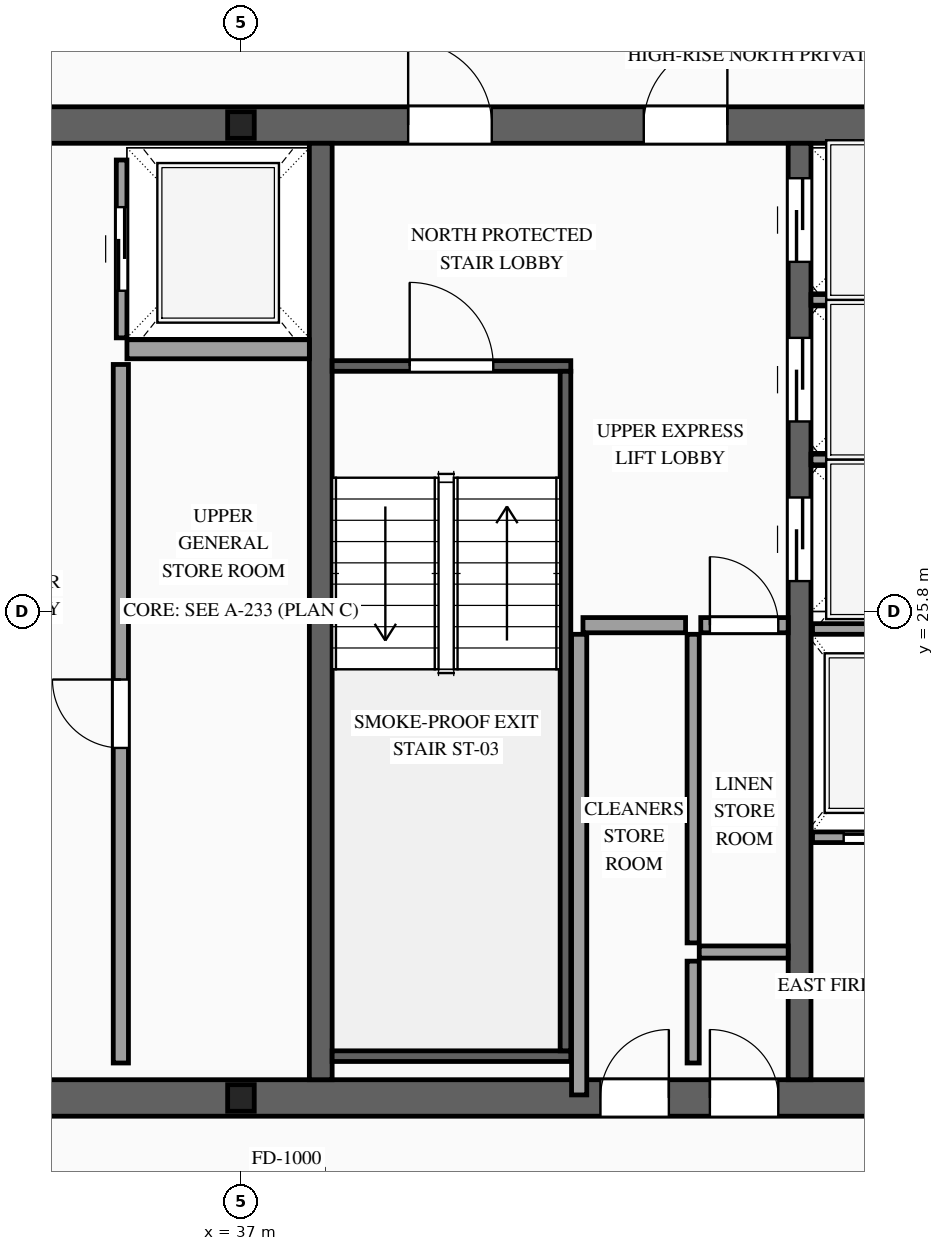
"""IFC4 building model, lengths in metres.
Left out: names, types, materials, properties, quantities, classifications, styles, units other than length and angle.
Written with IfcOpenShell. Run it as: python <this file> out.ifc"""

import sys

from ifc_helpers import new_model, si_unit, direction, frame, frame_2d, origin, origin_2d, place, context, subcontext, project, spatial, rectangle, i_section, extrude, source, transform, mapped, element, fill, save


model = new_model("IFC4")
c1 = context("Model", 3, precision=1e-05, world=origin(), true_north=direction((0.0, 1.0)))
c2 = subcontext(c1, "Body", "Model", "MODEL_VIEW")
j1 = project(units=[si_unit("LENGTHUNIT", "METRE"), si_unit("PLANEANGLEUNIT", "RADIAN")], contexts=[c1])
p1 = place(None, origin())
s1 = spatial("IfcSite", under=j1, at=p1, CompositionType="ELEMENT")
p2 = place(p1, origin())
s2 = spatial("IfcBuilding", under=s1, at=p2, CompositionType="ELEMENT")
p3 = place(p2, frame((0.0, 0.0, 335.7)))
s3 = spatial("IfcBuildingStorey", under=s2, at=p3, CompositionType="ELEMENT", Elevation=335.7)
p4 = place(p3, frame((23.56, 19.4, 0.0), z_axis=(0.0, 0.0, 1.0), x_axis=(1.0, 0.0, 0.0)))
e1 = element("IfcWall", 1, at=p4, inside=s3, PredefinedType="SHEAR", context=c2, shape_type="SweptSolid", body=[
    extrude(rectangle(XDim=26.88, YDim=0.48, at=frame_2d((13.44, 0.0))), origin(), (0.0, 0.0, 1.0), 3.5),
])
p5 = place(p4, frame((1.89, 0.0, 0.0)))
e2 = element("IfcOpeningElement", 2, at=p5, cuts=e1, PredefinedType="OPENING", context=c2, shape_type="SweptSolid", body=[
    extrude(rectangle(XDim=1.1, YDim=2.2, at=frame_2d((0.55, 1.1))), frame((0.0, 0.255, 0.0), z_axis=(0.0, -1.0, 0.0), x_axis=(1.0, 0.0, 0.0)), (0.0, 0.0, 1.0), 0.51),
])
p6 = place(p4, frame((9.79, 0.0, 0.0)))
e3 = element("IfcOpeningElement", 3, at=p6, cuts=e1, PredefinedType="OPENING", context=c2, shape_type="SweptSolid", body=[
    extrude(rectangle(XDim=1.1, YDim=2.2, at=frame_2d((0.55, 1.1))), frame((0.0, 0.255, 0.0), z_axis=(0.0, -1.0, 0.0), x_axis=(1.0, 0.0, 0.0)), (0.0, 0.0, 1.0), 0.51),
])
p7 = place(p4, frame((22.99, 0.0, 0.0)))
e4 = element("IfcOpeningElement", 4, at=p7, cuts=e1, PredefinedType="OPENING", context=c2, shape_type="SweptSolid", body=[
    extrude(rectangle(XDim=1.1, YDim=2.2, at=frame_2d((0.55, 1.1))), frame((0.0, 0.255, 0.0), z_axis=(0.0, -1.0, 0.0), x_axis=(1.0, 0.0, 0.0)), (0.0, 0.0, 1.0), 0.51),
])
p8 = place(p4, frame((19.61, 0.0, 0.0)))
e5 = element("IfcOpeningElement", 5, at=p8, cuts=e1, PredefinedType="OPENING", context=c2, shape_type="SweptSolid", body=[
    extrude(rectangle(XDim=0.9, YDim=2.15, at=frame_2d((0.45, 1.075))), frame((0.0, 0.255, 0.0), z_axis=(0.0, -1.0, 0.0), x_axis=(1.0, 0.0, 0.0)), (0.0, 0.0, 1.0), 0.51),
])
p9 = place(p4, frame((18.17, 0.0, 0.0)))
e6 = element("IfcOpeningElement", 6, at=p9, cuts=e1, PredefinedType="OPENING", context=c2, shape_type="SweptSolid", body=[
    extrude(rectangle(XDim=0.9, YDim=2.15, at=frame_2d((0.45, 1.075))), frame((0.0, 0.255, 0.0), z_axis=(0.0, -1.0, 0.0), x_axis=(1.0, 0.0, 0.0)), (0.0, 0.0, 1.0), 0.51),
])
p10 = place(p3, frame((23.56, 32.2, 0.0), z_axis=(0.0, 0.0, 1.0), x_axis=(1.0, 0.0, 0.0)))
e7 = element("IfcWall", 7, at=p10, inside=s3, PredefinedType="SHEAR", context=c2, shape_type="SweptSolid", body=[
    extrude(rectangle(XDim=26.88, YDim=0.48, at=frame_2d((13.44, 0.0))), origin(), (0.0, 0.0, 1.0), 3.5),
])
p11 = place(p10, frame((4.51, 0.0, 0.0)))
e8 = element("IfcOpeningElement", 8, at=p11, cuts=e7, PredefinedType="OPENING", context=c2, shape_type="SweptSolid", body=[
    extrude(rectangle(XDim=0.9, YDim=2.15, at=frame_2d((0.45, 1.075))), frame((0.0, 0.255, 0.0), z_axis=(0.0, -1.0, 0.0), x_axis=(1.0, 0.0, 0.0)), (0.0, 0.0, 1.0), 0.51),
])
p12 = place(p10, frame((9.79, 0.0, 0.0)))
e9 = element("IfcOpeningElement", 9, at=p12, cuts=e7, PredefinedType="OPENING", context=c2, shape_type="SweptSolid", body=[
    extrude(rectangle(XDim=1.1, YDim=2.2, at=frame_2d((0.55, 1.1))), frame((0.0, 0.255, 0.0), z_axis=(0.0, -1.0, 0.0), x_axis=(1.0, 0.0, 0.0)), (0.0, 0.0, 1.0), 0.51),
])
p13 = place(p10, frame((15.64, 0.0, 0.0)))
e10 = element("IfcOpeningElement", 10, at=p13, cuts=e7, PredefinedType="OPENING", context=c2, shape_type="SweptSolid", body=[
    extrude(rectangle(XDim=1.1, YDim=2.2, at=frame_2d((0.55, 1.1))), frame((0.0, 0.255, 0.0), z_axis=(0.0, -1.0, 0.0), x_axis=(1.0, 0.0, 0.0)), (0.0, 0.0, 1.0), 0.51),
])
p14 = place(p10, frame((18.74, 0.0, 0.0)))
e11 = element("IfcOpeningElement", 11, at=p14, cuts=e7, PredefinedType="OPENING", context=c2, shape_type="SweptSolid", body=[
    extrude(rectangle(XDim=1.1, YDim=2.2, at=frame_2d((0.55, 1.1))), frame((0.0, 0.255, 0.0), z_axis=(0.0, -1.0, 0.0), x_axis=(1.0, 0.0, 0.0)), (0.0, 0.0, 1.0), 0.51),
])
m1 = source(origin(), c2, "Body", "SweptSolid", [
    extrude(rectangle(XDim=12.32, YDim=0.3, at=frame_2d((6.16, 0.0))), origin(), (0.0, 0.0, 1.0), 3.5),
])
p15 = place(p3, frame((38.05, 19.64, 0.0), z_axis=(0.0, 0.0, 1.0), x_axis=(0.0, 1.0, 0.0)))
e12 = element("IfcWall", 12, at=p15, inside=s3, PredefinedType="SOLIDWALL", context=c2, shape_type="MappedRepresentation", body=[
    mapped(m1, transform((0.0, 0.0, 0.0), scale=1.0)),
])
p16 = place(p3, frame((44.35, 19.64, 0.0), z_axis=(0.0, 0.0, 1.0), x_axis=(0.0, 1.0, 0.0)))
e13 = element("IfcWall", 13, at=p16, inside=s3, PredefinedType="SOLIDWALL", context=c2, shape_type="SweptSolid", body=[
    extrude(rectangle(XDim=12.32, YDim=0.3, at=frame_2d((6.16, 0.0))), origin(), (0.0, 0.0, 1.0), 3.5),
])
p17 = place(p16, frame((6.56, 0.0, 0.0)))
e14 = element("IfcOpeningElement", 14, at=p17, cuts=e13, PredefinedType="OPENING", context=c2, shape_type="SweptSolid", body=[
    extrude(rectangle(XDim=1.1, YDim=2.2, at=frame_2d((0.55, 1.1))), frame((0.0, 0.165, 0.0), z_axis=(0.0, -1.0, 0.0), x_axis=(1.0, 0.0, 0.0)), (0.0, 0.0, 1.0), 0.33),
])
p18 = place(p16, frame((8.66, 0.0, 0.0)))
e15 = element("IfcOpeningElement", 15, at=p18, cuts=e13, PredefinedType="OPENING", context=c2, shape_type="SweptSolid", body=[
    extrude(rectangle(XDim=1.1, YDim=2.2, at=frame_2d((0.55, 1.1))), frame((0.0, 0.165, 0.0), z_axis=(0.0, -1.0, 0.0), x_axis=(1.0, 0.0, 0.0)), (0.0, 0.0, 1.0), 0.33),
])
p19 = place(p16, frame((10.76, 0.0, 0.0)))
e16 = element("IfcOpeningElement", 16, at=p19, cuts=e13, PredefinedType="OPENING", context=c2, shape_type="SweptSolid", body=[
    extrude(rectangle(XDim=1.1, YDim=2.2, at=frame_2d((0.55, 1.1))), frame((0.0, 0.165, 0.0), z_axis=(0.0, -1.0, 0.0), x_axis=(1.0, 0.0, 0.0)), (0.0, 0.0, 1.0), 0.33),
])
m2 = source(origin(), c2, "Body", "SweptSolid", [
    extrude(i_section(OverallWidth=0.35, OverallDepth=0.35, WebThickness=0.012, FlangeThickness=0.019, at=origin_2d()), origin(), (0.0, 0.0, 1.0), 3.5),
])
for number, where, z_axis, x_axis in (
    (17, (37.0, 19.4, 0.0), (0.0, 0.0, 1.0), (1.0, 0.0, 0.0)),
    (18, (37.0, 32.2, 0.0), (0.0, 0.0, 1.0), (1.0, 0.0, 0.0)),
):
    element("IfcColumn", number, at=place(p3, frame(where, z_axis=z_axis, x_axis=x_axis)), inside=s3, PredefinedType="COLUMN", context=c2, shape_type="MappedRepresentation", body=[
        mapped(m2, transform((0.0, 0.0, 0.0), scale=1.0)),
    ])
p20 = place(p3, frame((44.52, 22.83, 0.0), z_axis=(0.0, 0.0, 1.0), x_axis=(1.0, 0.0, 0.0)))
e19 = element("IfcWall", 19, at=p20, inside=s3, PredefinedType="SOLIDWALL", context=c2, shape_type="SweptSolid", body=[
    extrude(rectangle(XDim=1.92, YDim=0.14, at=frame_2d((0.96, 0.0))), origin(), (0.0, 0.0, 1.0), 3.26),
])
p21 = place(p20, frame((0.41, 0.0, 0.0)))
e20 = element("IfcOpeningElement", 20, at=p21, cuts=e19, PredefinedType="OPENING", context=c2, shape_type="SweptSolid", body=[
    extrude(rectangle(XDim=1.1, YDim=2.2, at=frame_2d((0.55, 1.1))), frame((0.0, 0.085, 0.0), z_axis=(0.0, -1.0, 0.0), x_axis=(1.0, 0.0, 0.0)), (0.0, 0.0, 1.0), 0.17),
])
m3 = source(origin(), c2, "Body", "SweptSolid", [
    extrude(rectangle(XDim=1.92, YDim=0.14, at=frame_2d((0.96, 0.0))), origin(), (0.0, 0.0, 1.0), 3.26),
])
p22 = place(p3, frame((44.52, 25.57, 0.0), z_axis=(0.0, 0.0, 1.0), x_axis=(1.0, 0.0, 0.0)))
e21 = element("IfcWall", 21, at=p22, inside=s3, PredefinedType="SOLIDWALL", context=c2, shape_type="MappedRepresentation", body=[
    mapped(m3, transform((0.0, 0.0, 0.0), scale=1.0)),
])
p23 = place(p3, frame((35.43, 29.4, 0.0), z_axis=(0.0, 0.0, 1.0), x_axis=(0.0, 1.0, 0.0)))
e22 = element("IfcWall", 22, at=p23, inside=s3, PredefinedType="SOLIDWALL", context=c2, shape_type="SweptSolid", body=[
    extrude(rectangle(XDim=2.34, YDim=0.14, at=frame_2d((1.17, 0.0))), origin(), (0.0, 0.0, 1.0), 3.26),
])
p24 = place(p23, frame((0.62, 0.0, 0.0)))
e23 = element("IfcOpeningElement", 23, at=p24, cuts=e22, PredefinedType="OPENING", context=c2, shape_type="SweptSolid", body=[
    extrude(rectangle(XDim=1.1, YDim=2.2, at=frame_2d((0.55, 1.1))), frame((0.0, 0.085, 0.0), z_axis=(0.0, -1.0, 0.0), x_axis=(1.0, 0.0, 0.0)), (0.0, 0.0, 1.0), 0.17),
])
m4 = source(origin(), c2, "Body", "SweptSolid", [
    extrude(rectangle(XDim=2.4, YDim=0.25, at=frame_2d((1.2, 0.0))), origin(), (0.0, 0.0, 1.0), 3.26),
])
p25 = place(p3, frame((35.5, 29.25, 0.0), z_axis=(0.0, 0.0, 1.0), x_axis=(1.0, 0.0, 0.0)))
e24 = element("IfcWall", 24, at=p25, inside=s3, PredefinedType="SOLIDWALL", context=c2, shape_type="MappedRepresentation", body=[
    mapped(m4, transform((0.0, 0.0, 0.0), scale=1.0)),
])
m5 = source(origin(), c2, "Body", "SweptSolid", [
    extrude(rectangle(XDim=2.0, YDim=0.14, at=frame_2d((1.0, 0.0))), origin(), (0.0, 0.0, 1.0), 3.26),
])
for number, where, z_axis, x_axis in (
    (25, (44.5, 27.8, 0.0), (0.0, 0.0, 1.0), (1.0, 0.0, 0.0)),
    (26, (44.5, 29.9, 0.0), (0.0, 0.0, 1.0), (1.0, 0.0, 0.0)),
):
    element("IfcWall", number, at=place(p3, frame(where, z_axis=z_axis, x_axis=x_axis)), inside=s3, PredefinedType="SOLIDWALL", context=c2, shape_type="MappedRepresentation", body=[
        mapped(m5, transform((0.0, 0.0, 0.0), scale=1.0)),
    ])
p26 = place(p3, frame((38.2, 29.03, 0.0), z_axis=(0.0, 0.0, 1.0), x_axis=(1.0, 0.0, 0.0)))
e27 = element("IfcWall", 27, at=p26, inside=s3, PredefinedType="SOLIDWALL", context=c2, shape_type="SweptSolid", body=[
    extrude(rectangle(XDim=3.14, YDim=0.14, at=frame_2d((1.57, 0.0))), origin(), (0.0, 0.0, 1.0), 3.26),
])
p27 = place(p26, frame((1.02, 0.0, 0.0)))
e28 = element("IfcOpeningElement", 28, at=p27, cuts=e27, PredefinedType="OPENING", context=c2, shape_type="SweptSolid", body=[
    extrude(rectangle(XDim=1.1, YDim=2.2, at=frame_2d((0.55, 1.1))), frame((0.0, 0.085, 0.0), z_axis=(0.0, -1.0, 0.0), x_axis=(1.0, 0.0, 0.0)), (0.0, 0.0, 1.0), 0.17),
])
m6 = source(origin(), c2, "Body", "SweptSolid", [
    extrude(rectangle(XDim=3.14, YDim=0.14, at=frame_2d((1.57, 0.0))), origin(), (0.0, 0.0, 1.0), 3.26),
])
p28 = place(p3, frame((38.2, 19.95, 0.0), z_axis=(0.0, 0.0, 1.0), x_axis=(1.0, 0.0, 0.0)))
e29 = element("IfcWall", 29, at=p28, inside=s3, PredefinedType="SOLIDWALL", context=c2, shape_type="MappedRepresentation", body=[
    mapped(m6, transform((0.0, 0.0, 0.0), scale=1.0)),
])
m7 = source(origin(), c2, "Body", "SweptSolid", [
    extrude(rectangle(XDim=8.94, YDim=0.14, at=frame_2d((4.47, 0.0))), origin(), (0.0, 0.0, 1.0), 3.26),
])
p29 = place(p3, frame((41.27, 20.02, 0.0), z_axis=(0.0, 0.0, 1.0), x_axis=(0.0, 1.0, 0.0)))
e30 = element("IfcWall", 30, at=p29, inside=s3, PredefinedType="SOLIDWALL", context=c2, shape_type="MappedRepresentation", body=[
    mapped(m7, transform((0.0, 0.0, 0.0), scale=1.0)),
])
p30 = place(p3, frame((35.42, 19.86, 0.0), z_axis=(0.0, 0.0, 1.0), x_axis=(0.0, 1.0, 0.0)))
e31 = element("IfcWall", 31, at=p30, inside=s3, PredefinedType="PARTITIONING", context=c2, shape_type="SweptSolid", body=[
    extrude(rectangle(XDim=9.19, YDim=0.2, at=frame_2d((4.595, 0.0))), origin(), (0.0, 0.0, 1.0), 3.26),
])
p31 = place(p30, frame((4.145, 0.0, 0.0)))
e32 = element("IfcOpeningElement", 32, at=p31, cuts=e31, PredefinedType="OPENING", context=c2, shape_type="SweptSolid", body=[
    extrude(rectangle(XDim=0.9, YDim=2.15, at=frame_2d((0.45, 1.075))), frame((0.0, 0.115, 0.0), z_axis=(0.0, -1.0, 0.0), x_axis=(1.0, 0.0, 0.0)), (0.0, 0.0, 1.0), 0.23),
])
m8 = source(origin(), c2, "Body", "SweptSolid", [
    extrude(rectangle(XDim=1.34, YDim=0.16, at=frame_2d((0.67, 0.0))), origin(), (0.0, 0.0, 1.0), 3.26),
])
p32 = place(p3, frame((42.95, 19.86, 0.0), z_axis=(0.0, 0.0, 1.0), x_axis=(0.0, 1.0, 0.0)))
e33 = element("IfcWall", 33, at=p32, inside=s3, PredefinedType="PARTITIONING", context=c2, shape_type="MappedRepresentation", body=[
    mapped(m8, transform((0.0, 0.0, 0.0), scale=1.0)),
])
m9 = source(origin(), c2, "Body", "SweptSolid", [
    extrude(rectangle(XDim=1.17, YDim=0.16, at=frame_2d((0.585, 0.0))), origin(), (0.0, 0.0, 1.0), 3.26),
])
p33 = place(p3, frame((43.03, 21.32, 0.0), z_axis=(0.0, 0.0, 1.0), x_axis=(1.0, 0.0, 0.0)))
e34 = element("IfcWall", 34, at=p33, inside=s3, PredefinedType="PARTITIONING", context=c2, shape_type="MappedRepresentation", body=[
    mapped(m9, transform((0.0, 0.0, 0.0), scale=1.0)),
])
m10 = source(origin(), c2, "Body", "SweptSolid", [
    extrude(rectangle(XDim=6.06, YDim=0.2, at=frame_2d((3.03, 0.0))), origin(), (0.0, 0.0, 1.0), 3.26),
])
p34 = place(p3, frame((41.45, 19.44, 0.0), z_axis=(0.0, 0.0, 1.0), x_axis=(0.0, 1.0, 0.0)))
e35 = element("IfcWall", 35, at=p34, inside=s3, PredefinedType="PARTITIONING", context=c2, shape_type="MappedRepresentation", body=[
    mapped(m10, transform((0.0, 0.0, 0.0), scale=1.0)),
])
m11 = source(origin(), c2, "Body", "SweptSolid", [
    extrude(rectangle(XDim=1.35, YDim=0.2, at=frame_2d((0.675, 0.0))), origin(), (0.0, 0.0, 1.0), 3.26),
])
p35 = place(p3, frame((41.5, 25.62, 0.0), z_axis=(0.0, 0.0, 1.0), x_axis=(1.0, 0.0, 0.0)))
e36 = element("IfcWall", 36, at=p35, inside=s3, PredefinedType="PARTITIONING", context=c2, shape_type="MappedRepresentation", body=[
    mapped(m11, transform((0.0, 0.0, 0.0), scale=1.0)),
])
m12 = source(origin(), c2, "Body", "SweptSolid", [
    extrude(rectangle(XDim=4.06, YDim=0.16, at=frame_2d((2.03, 0.0))), origin(), (0.0, 0.0, 1.0), 3.26),
])
p36 = place(p3, frame((42.95, 21.44, 0.0), z_axis=(0.0, 0.0, 1.0), x_axis=(0.0, 1.0, 0.0)))
e37 = element("IfcWall", 37, at=p36, inside=s3, PredefinedType="PARTITIONING", context=c2, shape_type="MappedRepresentation", body=[
    mapped(m12, transform((0.0, 0.0, 0.0), scale=1.0)),
])
p37 = place(p3, frame((43.05, 25.62, 0.0), z_axis=(0.0, 0.0, 1.0), x_axis=(1.0, 0.0, 0.0)))
e38 = element("IfcWall", 38, at=p37, inside=s3, PredefinedType="PARTITIONING", context=c2, shape_type="SweptSolid", body=[
    extrude(rectangle(XDim=1.15, YDim=0.2, at=frame_2d((0.575, 0.0))), origin(), (0.0, 0.0, 1.0), 3.26),
])
p38 = place(p37, frame((0.12, 0.0, 0.0)))
e39 = element("IfcOpeningElement", 39, at=p38, cuts=e38, PredefinedType="OPENING", context=c2, shape_type="SweptSolid", body=[
    extrude(rectangle(XDim=0.9, YDim=2.15, at=frame_2d((0.45, 1.075))), frame((0.0, 0.115, 0.0), z_axis=(0.0, -1.0, 0.0), x_axis=(1.0, 0.0, 0.0)), (0.0, 0.0, 1.0), 0.23),
])
m13 = source(origin(), c2, "Body", "SweptSolid", [
    extrude(rectangle(XDim=1.1, YDim=2.2, at=frame_2d((0.55, 1.1))), frame((0.0, 0.025, 0.0), z_axis=(0.0, -1.0, 0.0), x_axis=(1.0, 0.0, 0.0)), (0.0, 0.0, 1.0), 0.05),
])
p39 = place(p21, origin())
e40 = element("IfcDoor", 40, at=p39, inside=s3, OperationType="SLIDING_TO_RIGHT", PredefinedType="DOOR", context=c2, shape_type="MappedRepresentation", body=[
    mapped(m13, transform((0.0, 0.0, 0.0), scale=1.0)),
])
fill(e20, e40)
p40 = place(p24, origin())
e41 = element("IfcDoor", 41, at=p40, inside=s3, OperationType="SLIDING_TO_RIGHT", PredefinedType="DOOR", context=c2, shape_type="MappedRepresentation", body=[
    mapped(m13, transform((0.0, 0.0, 0.0), scale=1.0)),
])
fill(e23, e41)
p41 = place(p17, origin())
e42 = element("IfcDoor", 42, at=p41, inside=s3, OperationType="SLIDING_TO_LEFT", PredefinedType="DOOR", context=c2, shape_type="MappedRepresentation", body=[
    mapped(m13, transform((0.0, 0.0, 0.0), scale=1.0)),
])
fill(e14, e42)
p42 = place(p18, origin())
e43 = element("IfcDoor", 43, at=p42, inside=s3, OperationType="SLIDING_TO_RIGHT", PredefinedType="DOOR", context=c2, shape_type="MappedRepresentation", body=[
    mapped(m13, transform((0.0, 0.0, 0.0), scale=1.0)),
])
fill(e15, e43)
p43 = place(p19, origin())
e44 = element("IfcDoor", 44, at=p43, inside=s3, OperationType="SLIDING_TO_LEFT", PredefinedType="DOOR", context=c2, shape_type="MappedRepresentation", body=[
    mapped(m13, transform((0.0, 0.0, 0.0), scale=1.0)),
])
fill(e16, e44)
m14 = source(origin(), c2, "Body", "SweptSolid", [
    extrude(rectangle(XDim=1.1, YDim=2.2, at=frame_2d((0.55, 1.1))), frame((0.0, 0.025, 0.0), z_axis=(0.0, -1.0, 0.0), x_axis=(1.0, 0.0, 0.0)), (0.0, 0.0, 1.0), 0.05),
])
p44 = place(p27, origin())
e45 = element("IfcDoor", 45, at=p44, inside=s3, OperationType="SINGLE_SWING_LEFT", PredefinedType="DOOR", context=c2, shape_type="MappedRepresentation", body=[
    mapped(m14, transform((0.0, 0.0, 0.0), scale=1.0)),
])
fill(e28, e45)
p45 = place(p13, origin())
e46 = element("IfcDoor", 46, at=p45, inside=s3, OperationType="SINGLE_SWING_LEFT", PredefinedType="DOOR", context=c2, shape_type="MappedRepresentation", body=[
    mapped(m14, transform((0.0, 0.0, 0.0), scale=1.0)),
])
fill(e10, e46)
p46 = place(p14, origin())
e47 = element("IfcDoor", 47, at=p46, inside=s3, OperationType="SINGLE_SWING_RIGHT", PredefinedType="DOOR", context=c2, shape_type="MappedRepresentation", body=[
    mapped(m14, transform((0.0, 0.0, 0.0), scale=1.0)),
])
fill(e11, e47)
m15 = source(origin(), c2, "Body", "SweptSolid", [
    extrude(rectangle(XDim=0.9, YDim=2.15, at=frame_2d((0.45, 1.075))), frame((0.0, 0.025, 0.0), z_axis=(0.0, -1.0, 0.0), x_axis=(1.0, 0.0, 0.0)), (0.0, 0.0, 1.0), 0.05),
])
p47 = place(p31, origin())
e48 = element("IfcDoor", 48, at=p47, inside=s3, OperationType="SINGLE_SWING_RIGHT", PredefinedType="DOOR", context=c2, shape_type="MappedRepresentation", body=[
    mapped(m15, transform((0.0, 0.0, 0.0), scale=1.0)),
])
fill(e32, e48)
p48 = place(p8, origin())
e49 = element("IfcDoor", 49, at=p48, inside=s3, OperationType="SINGLE_SWING_LEFT", PredefinedType="DOOR", context=c2, shape_type="MappedRepresentation", body=[
    mapped(m15, transform((0.0, 0.0, 0.0), scale=1.0)),
])
fill(e5, e49)
p49 = place(p9, origin())
e50 = element("IfcDoor", 50, at=p49, inside=s3, OperationType="SINGLE_SWING_RIGHT", PredefinedType="DOOR", context=c2, shape_type="MappedRepresentation", body=[
    mapped(m15, transform((0.0, 0.0, 0.0), scale=1.0)),
])
fill(e6, e50)
p50 = place(p38, origin())
e51 = element("IfcDoor", 51, at=p50, inside=s3, OperationType="SINGLE_SWING_LEFT", PredefinedType="DOOR", context=c2, shape_type="MappedRepresentation", body=[
    mapped(m15, transform((0.0, 0.0, 0.0), scale=1.0)),
])
fill(e39, e51)
save(model, sys.argv[1])
